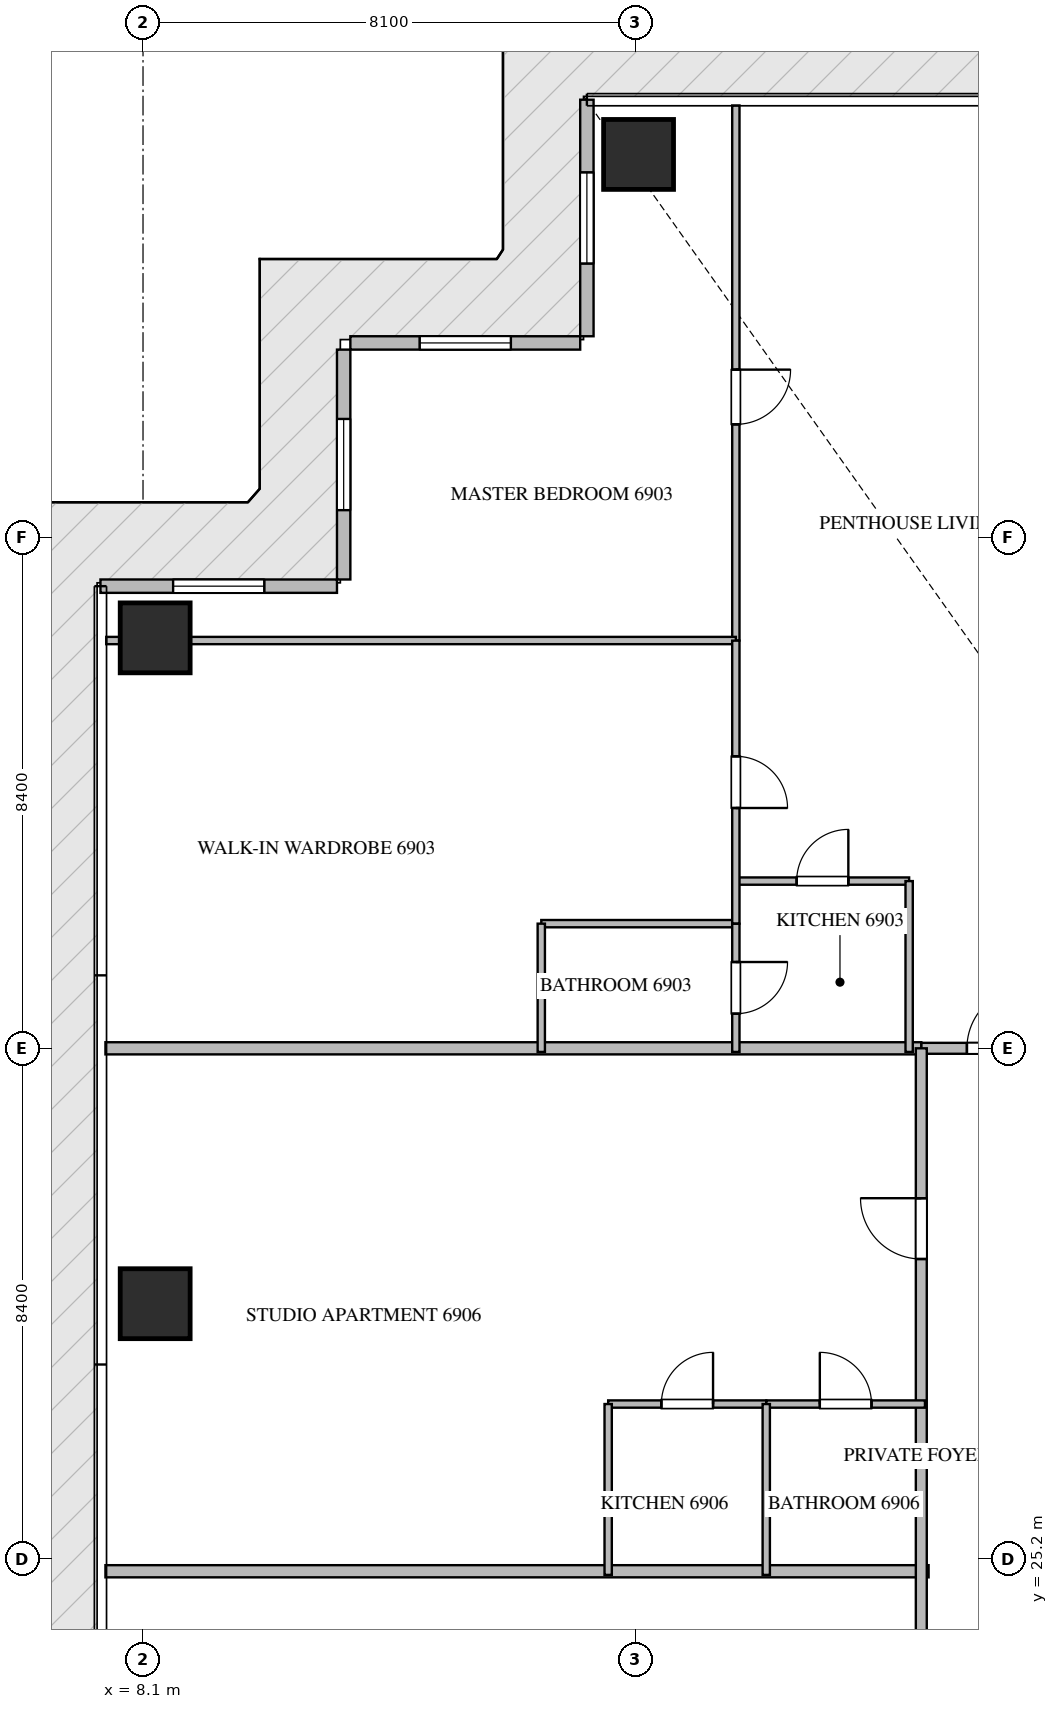
"""IFC4 building model, lengths in metres.
Left out: names, types, materials, properties, quantities, classifications, styles, units other than length and angle.
Written with IfcOpenShell. Run it as: python <this file> out.ifc"""

import sys

from ifc_helpers import new_model, si_unit, direction, frame, frame_2d, origin, origin_2d, place, context, subcontext, project, spatial, rectangle, extrude, source, transform, mapped, element, fill, save


model = new_model("IFC4")
c1 = context("Model", 3, precision=1e-05, world=origin(), true_north=direction((0.0, 1.0)))
c2 = subcontext(c1, "Body", "Model", "MODEL_VIEW")
j1 = project(units=[si_unit("LENGTHUNIT", "METRE"), si_unit("PLANEANGLEUNIT", "RADIAN")], contexts=[c1])
p1 = place(None, origin())
s1 = spatial("IfcSite", under=j1, at=p1, CompositionType="ELEMENT")
p2 = place(p1, origin())
s2 = spatial("IfcBuilding", under=s1, at=p2, CompositionType="ELEMENT")
p3 = place(p2, frame((0.0, 0.0, 275.9)))
s3 = spatial("IfcBuildingStorey", under=s2, at=p3, CompositionType="ELEMENT", Elevation=275.9)
m1 = source(origin(), c2, "Body", "SweptSolid", [
    extrude(rectangle(XDim=1.15, YDim=1.15, at=origin_2d()), origin(), (0.0, 0.0, 1.0), 3.85),
])
for number, where, z_axis, x_axis in (
    (1, (16.25, 48.3, -0.26), (0.0, 0.0, 1.0), (1.0, 0.0, 0.0)),
    (2, (8.3, 29.4, -0.26), (0.0, 0.0, 1.0), (1.0, 0.0, 0.0)),
    (3, (8.3, 40.35, -0.26), (0.0, 0.0, 1.0), (1.0, 0.0, 0.0)),
):
    element("IfcColumn", number, at=place(p3, frame(where, z_axis=z_axis, x_axis=x_axis)), inside=s3, PredefinedType="COLUMN", context=c2, shape_type="MappedRepresentation", body=[
        mapped(m1, transform((0.0, 0.0, 0.0), scale=1.0)),
    ])
p4 = place(p3, frame((15.4, 49.2, 0.0), z_axis=(0.0, 0.0, 1.0), x_axis=(0.0, -1.0, 0.0)))
e4 = element("IfcWall", 4, at=p4, inside=s3, PredefinedType="ELEMENTEDWALL", context=c2, shape_type="SweptSolid", body=[
    extrude(rectangle(XDim=3.89, YDim=0.22, at=frame_2d((1.945, 0.0))), origin(), (0.0, 0.0, 1.0), 3.575),
])
p5 = place(p4, frame((1.195, 0.0, 0.65)))
e5 = element("IfcOpeningElement", 5, at=p5, cuts=e4, PredefinedType="OPENING", context=c2, shape_type="SweptSolid", body=[
    extrude(rectangle(XDim=1.5, YDim=2.25, at=frame_2d((0.75, 1.125))), frame((0.0, 0.12, 0.0), z_axis=(0.0, -1.0, 0.0), x_axis=(1.0, 0.0, 0.0)), (0.0, 0.0, 1.0), 0.24),
])
p6 = place(p3, frame((15.29, 45.2, 0.0), z_axis=(0.0, 0.0, 1.0), x_axis=(-1.0, 0.0, 0.0)))
e6 = element("IfcWall", 6, at=p6, inside=s3, PredefinedType="ELEMENTEDWALL", context=c2, shape_type="SweptSolid", body=[
    extrude(rectangle(XDim=3.78, YDim=0.22, at=frame_2d((1.89, 0.0))), origin(), (0.0, 0.0, 1.0), 3.575),
])
p7 = place(p6, frame((1.14, 0.0, 0.65)))
e7 = element("IfcOpeningElement", 7, at=p7, cuts=e6, PredefinedType="OPENING", context=c2, shape_type="SweptSolid", body=[
    extrude(rectangle(XDim=1.5, YDim=2.25, at=frame_2d((0.75, 1.125))), frame((0.0, 0.12, 0.0), z_axis=(0.0, -1.0, 0.0), x_axis=(1.0, 0.0, 0.0)), (0.0, 0.0, 1.0), 0.24),
])
p8 = place(p3, frame((11.4, 45.09, 0.0), z_axis=(0.0, 0.0, 1.0), x_axis=(0.0, -1.0, 0.0)))
e8 = element("IfcWall", 8, at=p8, inside=s3, PredefinedType="ELEMENTEDWALL", context=c2, shape_type="SweptSolid", body=[
    extrude(rectangle(XDim=3.78, YDim=0.22, at=frame_2d((1.89, 0.0))), origin(), (0.0, 0.0, 1.0), 3.575),
])
p9 = place(p8, frame((1.14, 0.0, 0.65)))
e9 = element("IfcOpeningElement", 9, at=p9, cuts=e8, PredefinedType="OPENING", context=c2, shape_type="SweptSolid", body=[
    extrude(rectangle(XDim=1.5, YDim=2.25, at=frame_2d((0.75, 1.125))), frame((0.0, 0.12, 0.0), z_axis=(0.0, -1.0, 0.0), x_axis=(1.0, 0.0, 0.0)), (0.0, 0.0, 1.0), 0.24),
])
p10 = place(p3, frame((11.29, 41.2, 0.0), z_axis=(0.0, 0.0, 1.0), x_axis=(-1.0, 0.0, 0.0)))
e10 = element("IfcWall", 10, at=p10, inside=s3, PredefinedType="ELEMENTEDWALL", context=c2, shape_type="SweptSolid", body=[
    extrude(rectangle(XDim=3.89, YDim=0.22, at=frame_2d((1.945, 0.0))), origin(), (0.0, 0.0, 1.0), 3.575),
])
p11 = place(p10, frame((1.195, 0.0, 0.65)))
e11 = element("IfcOpeningElement", 11, at=p11, cuts=e10, PredefinedType="OPENING", context=c2, shape_type="SweptSolid", body=[
    extrude(rectangle(XDim=1.5, YDim=2.25, at=frame_2d((0.75, 1.125))), frame((0.0, 0.12, 0.0), z_axis=(0.0, -1.0, 0.0), x_axis=(1.0, 0.0, 0.0)), (0.0, 0.0, 1.0), 0.24),
])
p12 = place(p3, frame((7.482, 25.0, 0.0), z_axis=(0.0, 0.0, 1.0), x_axis=(1.0, 0.0, 0.0)))
e12 = element("IfcWall", 12, at=p12, inside=s3, PredefinedType="PARTITIONING", context=c2, shape_type="SweptSolid", body=[
    extrude(rectangle(XDim=13.538, YDim=0.2, at=frame_2d((6.769, 0.0))), origin(), (0.0, 0.0, 1.0), 3.59),
])
p13 = place(p3, frame((7.482, 33.6, 0.0), z_axis=(0.0, 0.0, 1.0), x_axis=(1.0, 0.0, 0.0)))
e13 = element("IfcWall", 13, at=p13, inside=s3, PredefinedType="PARTITIONING", context=c2, shape_type="SweptSolid", body=[
    extrude(rectangle(XDim=13.418, YDim=0.2, at=frame_2d((6.709, 0.0))), origin(), (0.0, 0.0, 1.0), 3.59),
])
p14 = place(p3, frame((20.902, 33.6, 0.0), z_axis=(0.0, 0.0, 1.0), x_axis=(1.0, 0.0, 0.0)))
e14 = element("IfcWall", 14, at=p14, inside=s3, PredefinedType="PARTITIONING", context=c2, shape_type="SweptSolid", body=[
    extrude(rectangle(XDim=2.496, YDim=0.18, at=frame_2d((1.248, 0.0))), origin(), (0.0, 0.0, 1.0), 3.59),
])
p15 = place(p14, frame((0.748, 0.0, 0.0)))
e15 = element("IfcOpeningElement", 15, at=p15, cuts=e14, PredefinedType="OPENING", context=c2, shape_type="SweptSolid", body=[
    extrude(rectangle(XDim=1.0, YDim=2.15, at=frame_2d((0.5, 1.075))), frame((0.0, 0.1, 0.0), z_axis=(0.0, -1.0, 0.0), x_axis=(1.0, 0.0, 0.0)), (0.0, 0.0, 1.0), 0.2),
])
p16 = place(p3, frame((20.9, 16.8, 0.0), z_axis=(0.0, 0.0, 1.0), x_axis=(0.0, 1.0, 0.0)))
e16 = element("IfcWall", 16, at=p16, inside=s3, PredefinedType="PARTITIONING", context=c2, shape_type="SweptSolid", body=[
    extrude(rectangle(XDim=16.8, YDim=0.18, at=frame_2d((8.4, 0.0))), origin(), (0.0, 0.0, 1.0), 3.59),
])
p17 = place(p16, frame((4.898, 0.0, 0.0)))
e17 = element("IfcOpeningElement", 17, at=p17, cuts=e16, PredefinedType="OPENING", context=c2, shape_type="SweptSolid", body=[
    extrude(rectangle(XDim=1.0, YDim=2.15, at=frame_2d((0.5, 1.075))), frame((0.0, 0.1, 0.0), z_axis=(0.0, -1.0, 0.0), x_axis=(1.0, 0.0, 0.0)), (0.0, 0.0, 1.0), 0.2),
])
p18 = place(p16, frame((13.335, 0.0, 0.0)))
e18 = element("IfcOpeningElement", 18, at=p18, cuts=e16, PredefinedType="OPENING", context=c2, shape_type="SweptSolid", body=[
    extrude(rectangle(XDim=1.0, YDim=2.15, at=frame_2d((0.5, 1.075))), frame((0.0, 0.1, 0.0), z_axis=(0.0, -1.0, 0.0), x_axis=(1.0, 0.0, 0.0)), (0.0, 0.0, 1.0), 0.2),
])
p19 = place(p3, frame((17.85, 36.35, 0.0), z_axis=(0.0, 0.0, 1.0), x_axis=(1.0, 0.0, 0.0)))
e19 = element("IfcWall", 19, at=p19, inside=s3, PredefinedType="PARTITIONING", context=c2, shape_type="SweptSolid", body=[
    extrude(rectangle(XDim=2.85, YDim=0.12, at=frame_2d((1.425, 0.0))), origin(), (0.0, 0.0, 1.0), 3.59),
])
p20 = place(p19, frame((1.0, 0.0, 0.0)))
e20 = element("IfcOpeningElement", 20, at=p20, cuts=e19, PredefinedType="OPENING", context=c2, shape_type="SweptSolid", body=[
    extrude(rectangle(XDim=0.85, YDim=2.1, at=frame_2d((0.425, 1.05))), frame((0.0, 0.07, 0.0), z_axis=(0.0, -1.0, 0.0), x_axis=(1.0, 0.0, 0.0)), (0.0, 0.0, 1.0), 0.14),
])
p21 = place(p3, frame((20.7, 36.35, 0.0), z_axis=(0.0, 0.0, 1.0), x_axis=(0.0, -1.0, 0.0)))
e21 = element("IfcWall", 21, at=p21, inside=s3, PredefinedType="PARTITIONING", context=c2, shape_type="SweptSolid", body=[
    extrude(rectangle(XDim=2.81, YDim=0.12, at=frame_2d((1.405, 0.0))), origin(), (0.0, 0.0, 1.0), 3.59),
])
p22 = place(p3, frame((17.85, 49.105, 0.0), z_axis=(0.0, 0.0, 1.0), x_axis=(0.0, -1.0, 0.0)))
e22 = element("IfcWall", 22, at=p22, inside=s3, PredefinedType="PARTITIONING", context=c2, shape_type="SweptSolid", body=[
    extrude(rectangle(XDim=8.799, YDim=0.12, at=frame_2d((4.399, 0.0))), origin(), (0.0, 0.0, 1.0), 3.59),
])
p23 = place(p22, frame((4.344, 0.0, 0.0)))
e23 = element("IfcOpeningElement", 23, at=p23, cuts=e22, PredefinedType="OPENING", context=c2, shape_type="SweptSolid", body=[
    extrude(rectangle(XDim=0.9, YDim=2.1, at=frame_2d((0.45, 1.05))), frame((0.0, 0.07, 0.0), z_axis=(0.0, -1.0, 0.0), x_axis=(1.0, 0.0, 0.0)), (0.0, 0.0, 1.0), 0.14),
])
p24 = place(p3, frame((7.495, 40.306, 0.0), z_axis=(0.0, 0.0, 1.0), x_axis=(1.0, 0.0, 0.0)))
e24 = element("IfcWall", 24, at=p24, inside=s3, PredefinedType="PARTITIONING", context=c2, shape_type="SweptSolid", body=[
    extrude(rectangle(XDim=10.355, YDim=0.12, at=frame_2d((5.177, 0.0))), origin(), (0.0, 0.0, 1.0), 3.122),
])
p25 = place(p3, frame((14.65, 35.65, 0.0), z_axis=(0.0, 0.0, 1.0), x_axis=(1.0, 0.0, 0.0)))
e25 = element("IfcWall", 25, at=p25, inside=s3, PredefinedType="PARTITIONING", context=c2, shape_type="SweptSolid", body=[
    extrude(rectangle(XDim=3.2, YDim=0.12, at=frame_2d((1.6, 0.0))), origin(), (0.0, 0.0, 1.0), 3.59),
])
p26 = place(p3, frame((14.65, 35.65, 0.0), z_axis=(0.0, 0.0, 1.0), x_axis=(0.0, -1.0, 0.0)))
e26 = element("IfcWall", 26, at=p26, inside=s3, PredefinedType="PARTITIONING", context=c2, shape_type="SweptSolid", body=[
    extrude(rectangle(XDim=2.11, YDim=0.12, at=frame_2d((1.055, 0.0))), origin(), (0.0, 0.0, 1.0), 3.59),
])
p27 = place(p3, frame((17.85, 40.304, 0.0), z_axis=(0.0, 0.0, 1.0), x_axis=(0.0, -1.0, 0.0)))
e27 = element("IfcWall", 27, at=p27, inside=s3, PredefinedType="PARTITIONING", context=c2, shape_type="SweptSolid", body=[
    extrude(rectangle(XDim=4.654, YDim=0.12, at=frame_2d((2.327, 0.0))), origin(), (0.0, 0.0, 1.0), 3.59),
])
p28 = place(p27, frame((1.902, 0.0, 0.0)))
e28 = element("IfcOpeningElement", 28, at=p28, cuts=e27, PredefinedType="OPENING", context=c2, shape_type="SweptSolid", body=[
    extrude(rectangle(XDim=0.85, YDim=2.1, at=frame_2d((0.425, 1.05))), frame((0.0, 0.07, 0.0), z_axis=(0.0, -1.0, 0.0), x_axis=(1.0, 0.0, 0.0)), (0.0, 0.0, 1.0), 0.14),
])
p29 = place(p3, frame((17.85, 35.648, 0.0), z_axis=(0.0, 0.0, 1.0), x_axis=(0.0, -1.0, 0.0)))
e29 = element("IfcWall", 29, at=p29, inside=s3, PredefinedType="PARTITIONING", context=c2, shape_type="SweptSolid", body=[
    extrude(rectangle(XDim=2.108, YDim=0.12, at=frame_2d((1.054, 0.0))), origin(), (0.0, 0.0, 1.0), 3.59),
])
p30 = place(p29, frame((0.629, 0.0, 0.0)))
e30 = element("IfcOpeningElement", 30, at=p30, cuts=e29, PredefinedType="OPENING", context=c2, shape_type="SweptSolid", body=[
    extrude(rectangle(XDim=0.85, YDim=2.1, at=frame_2d((0.425, 1.05))), frame((0.0, 0.07, 0.0), z_axis=(0.0, -1.0, 0.0), x_axis=(1.0, 0.0, 0.0)), (0.0, 0.0, 1.0), 0.14),
])
p31 = place(p3, frame((15.75, 27.75, 0.0), z_axis=(0.0, 0.0, 1.0), x_axis=(1.0, 0.0, 0.0)))
e31 = element("IfcWall", 31, at=p31, inside=s3, PredefinedType="PARTITIONING", context=c2, shape_type="SweptSolid", body=[
    extrude(rectangle(XDim=2.6, YDim=0.12, at=frame_2d((1.3, 0.0))), origin(), (0.0, 0.0, 1.0), 3.59),
])
p32 = place(p31, frame((0.875, 0.0, 0.0)))
e32 = element("IfcOpeningElement", 32, at=p32, cuts=e31, PredefinedType="OPENING", context=c2, shape_type="SweptSolid", body=[
    extrude(rectangle(XDim=0.85, YDim=2.1, at=frame_2d((0.425, 1.05))), frame((0.0, 0.07, 0.0), z_axis=(0.0, -1.0, 0.0), x_axis=(1.0, 0.0, 0.0)), (0.0, 0.0, 1.0), 0.14),
])
p33 = place(p3, frame((18.352, 27.75, 0.0), z_axis=(0.0, 0.0, 1.0), x_axis=(1.0, 0.0, 0.0)))
e33 = element("IfcWall", 33, at=p33, inside=s3, PredefinedType="PARTITIONING", context=c2, shape_type="SweptSolid", body=[
    extrude(rectangle(XDim=2.608, YDim=0.12, at=frame_2d((1.304, 0.0))), origin(), (0.0, 0.0, 1.0), 3.59),
])
p34 = place(p33, frame((0.879, 0.0, 0.0)))
e34 = element("IfcOpeningElement", 34, at=p34, cuts=e33, PredefinedType="OPENING", context=c2, shape_type="SweptSolid", body=[
    extrude(rectangle(XDim=0.85, YDim=2.1, at=frame_2d((0.425, 1.05))), frame((0.0, 0.07, 0.0), z_axis=(0.0, -1.0, 0.0), x_axis=(1.0, 0.0, 0.0)), (0.0, 0.0, 1.0), 0.14),
])
for number, where, z_axis, x_axis in (
    (35, (18.35, 24.94, 0.0), (0.0, 0.0, 1.0), (0.0, 1.0, 0.0)),
    (36, (15.75, 24.94, 0.0), (0.0, 0.0, 1.0), (0.0, 1.0, 0.0)),
):
    element("IfcWall", number, at=place(p3, frame(where, z_axis=z_axis, x_axis=x_axis)), inside=s3, PredefinedType="PARTITIONING", context=c2, shape_type="SweptSolid", body=[
        extrude(rectangle(XDim=2.81, YDim=0.12, at=frame_2d((1.405, 0.0))), origin(), (0.0, 0.0, 1.0), 3.59),
    ])
m2 = source(origin(), c2, "Body", "SweptSolid", [
    extrude(rectangle(XDim=1.5, YDim=2.25, at=frame_2d((0.75, 1.125))), frame((0.0, 0.03, 0.0), z_axis=(0.0, -1.0, 0.0), x_axis=(1.0, 0.0, 0.0)), (0.0, 0.0, 1.0), 0.06),
])
p35 = place(p5, origin())
e37 = element("IfcWindow", 37, at=p35, inside=s3, PartitioningType="SINGLE_PANEL", PredefinedType="WINDOW", context=c2, shape_type="MappedRepresentation", body=[
    mapped(m2, transform((0.0, 0.0, 0.0), scale=1.0)),
])
fill(e5, e37)
p36 = place(p7, origin())
e38 = element("IfcWindow", 38, at=p36, inside=s3, PartitioningType="SINGLE_PANEL", PredefinedType="WINDOW", context=c2, shape_type="MappedRepresentation", body=[
    mapped(m2, transform((0.0, 0.0, 0.0), scale=1.0)),
])
fill(e7, e38)
p37 = place(p9, origin())
e39 = element("IfcWindow", 39, at=p37, inside=s3, PartitioningType="SINGLE_PANEL", PredefinedType="WINDOW", context=c2, shape_type="MappedRepresentation", body=[
    mapped(m2, transform((0.0, 0.0, 0.0), scale=1.0)),
])
fill(e9, e39)
p38 = place(p11, origin())
e40 = element("IfcWindow", 40, at=p38, inside=s3, PartitioningType="SINGLE_PANEL", PredefinedType="WINDOW", context=c2, shape_type="MappedRepresentation", body=[
    mapped(m2, transform((0.0, 0.0, 0.0), scale=1.0)),
])
fill(e11, e40)
m3 = source(origin(), c2, "Body", "SweptSolid", [
    extrude(rectangle(XDim=1.0, YDim=2.15, at=frame_2d((0.5, 1.075))), frame((0.0, 0.025, 0.0), z_axis=(0.0, -1.0, 0.0), x_axis=(1.0, 0.0, 0.0)), (0.0, 0.0, 1.0), 0.05),
])
p39 = place(p15, origin())
e41 = element("IfcDoor", 41, at=p39, inside=s3, OperationType="SINGLE_SWING_RIGHT", PredefinedType="DOOR", context=c2, shape_type="MappedRepresentation", body=[
    mapped(m3, transform((0.0, 0.0, 0.0), scale=1.0)),
])
fill(e15, e41)
p40 = place(p18, origin())
e42 = element("IfcDoor", 42, at=p40, inside=s3, OperationType="SINGLE_SWING_RIGHT", PredefinedType="DOOR", context=c2, shape_type="MappedRepresentation", body=[
    mapped(m3, transform((0.0, 0.0, 0.0), scale=1.0)),
])
fill(e18, e42)
m4 = source(origin(), c2, "Body", "SweptSolid", [
    extrude(rectangle(XDim=0.85, YDim=2.1, at=frame_2d((0.425, 1.05))), frame((0.0, 0.025, 0.0), z_axis=(0.0, -1.0, 0.0), x_axis=(1.0, 0.0, 0.0)), (0.0, 0.0, 1.0), 0.05),
])
p41 = place(p20, origin())
e43 = element("IfcDoor", 43, at=p41, inside=s3, OperationType="SINGLE_SWING_RIGHT", PredefinedType="DOOR", context=c2, shape_type="MappedRepresentation", body=[
    mapped(m4, transform((0.0, 0.0, 0.0), scale=1.0)),
])
fill(e20, e43)
m5 = source(origin(), c2, "Body", "SweptSolid", [
    extrude(rectangle(XDim=0.9, YDim=2.1, at=frame_2d((0.45, 1.05))), frame((0.0, 0.025, 0.0), z_axis=(0.0, -1.0, 0.0), x_axis=(1.0, 0.0, 0.0)), (0.0, 0.0, 1.0), 0.05),
])
p42 = place(p23, origin())
e44 = element("IfcDoor", 44, at=p42, inside=s3, OperationType="SINGLE_SWING_LEFT", PredefinedType="DOOR", context=c2, shape_type="MappedRepresentation", body=[
    mapped(m5, transform((0.0, 0.0, 0.0), scale=1.0)),
])
fill(e23, e44)
p43 = place(p28, origin())
e45 = element("IfcDoor", 45, at=p43, inside=s3, OperationType="SINGLE_SWING_RIGHT", PredefinedType="DOOR", context=c2, shape_type="MappedRepresentation", body=[
    mapped(m4, transform((0.0, 0.0, 0.0), scale=1.0)),
])
fill(e28, e45)
p44 = place(p30, origin())
e46 = element("IfcDoor", 46, at=p44, inside=s3, OperationType="SINGLE_SWING_LEFT", PredefinedType="DOOR", context=c2, shape_type="MappedRepresentation", body=[
    mapped(m4, transform((0.0, 0.0, 0.0), scale=1.0)),
])
fill(e30, e46)
p45 = place(p32, origin())
e47 = element("IfcDoor", 47, at=p45, inside=s3, OperationType="SINGLE_SWING_RIGHT", PredefinedType="DOOR", context=c2, shape_type="MappedRepresentation", body=[
    mapped(m4, transform((0.0, 0.0, 0.0), scale=1.0)),
])
fill(e32, e47)
p46 = place(p34, origin())
e48 = element("IfcDoor", 48, at=p46, inside=s3, OperationType="SINGLE_SWING_LEFT", PredefinedType="DOOR", context=c2, shape_type="MappedRepresentation", body=[
    mapped(m4, transform((0.0, 0.0, 0.0), scale=1.0)),
])
fill(e34, e48)
save(model, sys.argv[1])
